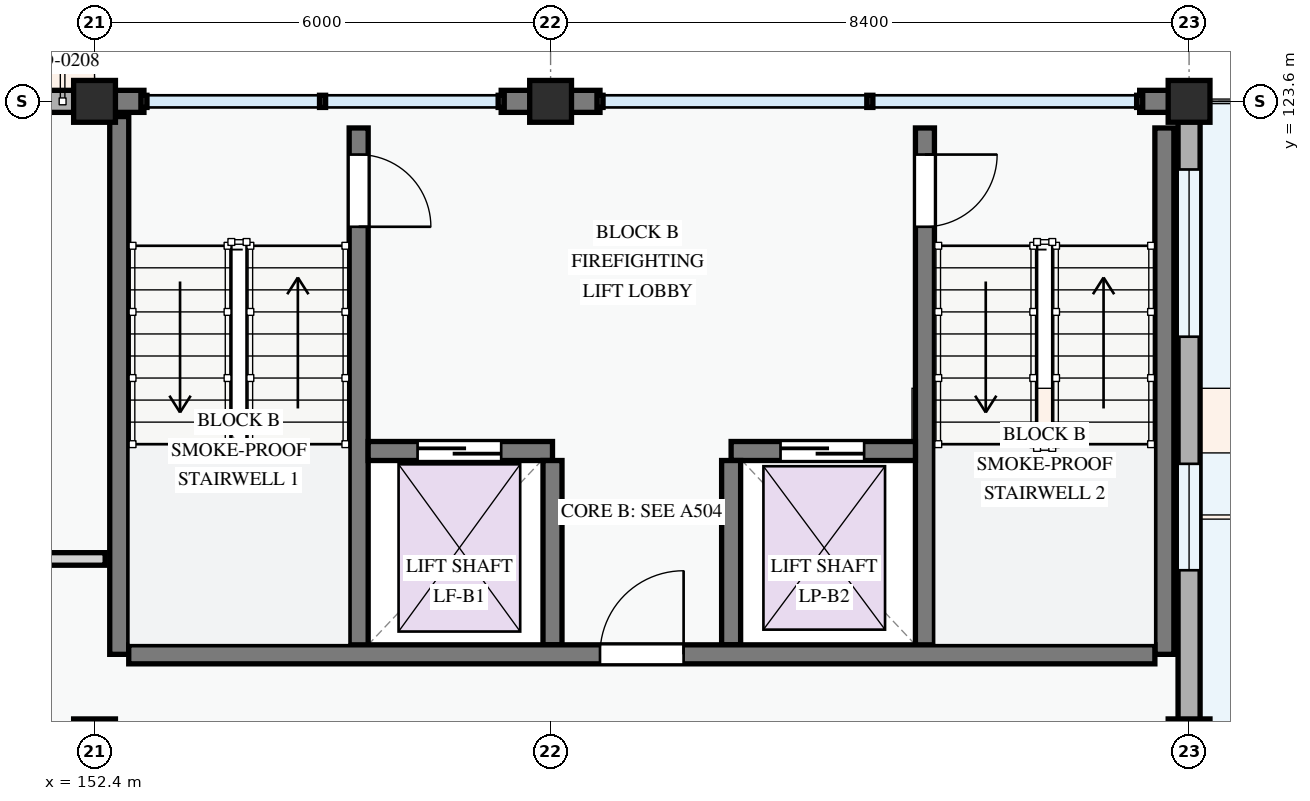
"""IFC4 building model, lengths in metres.
Left out: names, types, materials, properties, quantities, classifications, styles, units other than length and angle.
Written with IfcOpenShell. Run it as: python <this file> out.ifc"""

import sys

from ifc_helpers import new_model, si_unit, direction, frame, frame_2d, origin, origin_2d, place, context, subcontext, project, spatial, rectangle, extrude, element, fill, save


model = new_model("IFC4")
c1 = context("Model", 3, precision=1e-05, world=origin(), true_north=direction((0.0, 1.0)))
c2 = subcontext(c1, "Body", "Model", "MODEL_VIEW")
j1 = project(units=[si_unit("LENGTHUNIT", "METRE"), si_unit("PLANEANGLEUNIT", "RADIAN")], contexts=[c1])
p1 = place(None, origin())
s1 = spatial("IfcSite", under=j1, at=p1, CompositionType="ELEMENT")
p2 = place(p1, origin())
s2 = spatial("IfcBuilding", under=s1, at=p2, CompositionType="ELEMENT")
p3 = place(p2, frame((0.0, 0.0, 24.6)))
s3 = spatial("IfcBuildingStorey", under=s2, at=p3, CompositionType="ELEMENT", Elevation=24.6)
for number, where, z_axis, x_axis in (
    (1, (152.4, 115.2, 0.0), (0.0, 0.0, 1.0), (1.0, 0.0, 0.0)),
    (2, (152.4, 123.6, 0.0), (0.0, 0.0, 1.0), (1.0, 0.0, 0.0)),
    (3, (158.4, 123.6, 0.0), (0.0, 0.0, 1.0), (1.0, 0.0, 0.0)),
    (4, (166.8, 115.2, 0.0), (0.0, 0.0, 1.0), (1.0, 0.0, 0.0)),
    (5, (166.8, 123.6, 0.0), (0.0, 0.0, 1.0), (1.0, 0.0, 0.0)),
):
    element("IfcColumn", number, at=place(p3, frame(where, z_axis=z_axis, x_axis=x_axis)), inside=s3, PredefinedType="COLUMN", context=c2, shape_type="SweptSolid", body=[
        extrude(rectangle(XDim=0.55, YDim=0.55, at=origin_2d()), origin(), (0.0, 0.0, 1.0), 3.3),
    ])
p4 = place(p3, frame((166.8, 115.2, 0.0), z_axis=(0.0, 0.0, 1.0), x_axis=(0.0, 1.0, 0.0)))
e6 = element("IfcWall", 6, at=p4, inside=s3, PredefinedType="STANDARD", context=c2, shape_type="SweptSolid", body=[
    extrude(rectangle(XDim=8.4, YDim=0.29, at=frame_2d((4.2, 0.0))), origin(), (0.0, 0.0, 1.0), 2.425),
])
p5 = place(p4, frame((2.231, 0.0, 0.78)))
e7 = element("IfcOpeningElement", 7, at=p5, cuts=e6, PredefinedType="OPENING", context=c2, shape_type="SweptSolid", body=[
    extrude(rectangle(XDim=1.4, YDim=1.45, at=frame_2d((0.7, 0.725))), frame((0.0, 0.155, 0.0), z_axis=(0.0, -1.0, 0.0), x_axis=(1.0, 0.0, 0.0)), (0.0, 0.0, 1.0), 0.31),
])
p6 = place(p4, frame((5.304, 0.0, 0.78)))
e8 = element("IfcOpeningElement", 8, at=p6, cuts=e6, PredefinedType="OPENING", context=c2, shape_type="SweptSolid", body=[
    extrude(rectangle(XDim=2.2, YDim=1.5, at=frame_2d((1.1, 0.75))), frame((0.0, 0.155, 0.0), z_axis=(0.0, -1.0, 0.0), x_axis=(1.0, 0.0, 0.0)), (0.0, 0.0, 1.0), 0.31),
])
p7 = place(p3, frame((166.653, 123.6, 0.0), z_axis=(0.0, 0.0, 1.0), x_axis=(-1.0, 0.0, 0.0)))
e9 = element("IfcWall", 9, at=p7, inside=s3, PredefinedType="STANDARD", context=c2, shape_type="SweptSolid", body=[
    extrude(rectangle(XDim=0.503, YDim=0.29, at=frame_2d((0.251, 0.0))), origin(), (0.0, 0.0, 1.0), 3.04),
])
p8 = place(p3, frame((159.05, 123.6, 0.0), z_axis=(0.0, 0.0, 1.0), x_axis=(-1.0, 0.0, 0.0)))
e10 = element("IfcWall", 10, at=p8, inside=s3, PredefinedType="STANDARD", context=c2, shape_type="SweptSolid", body=[
    extrude(rectangle(XDim=0.65, YDim=0.29, at=frame_2d((0.325, 0.0))), origin(), (0.0, 0.0, 1.0), 3.04),
])
p9 = place(p3, frame((158.4, 123.6, 0.0), z_axis=(0.0, 0.0, 1.0), x_axis=(-1.0, 0.0, 0.0)))
e11 = element("IfcWall", 11, at=p9, inside=s3, PredefinedType="STANDARD", context=c2, shape_type="SweptSolid", body=[
    extrude(rectangle(XDim=0.65, YDim=0.29, at=frame_2d((0.325, 0.0))), origin(), (0.0, 0.0, 1.0), 3.04),
])
p10 = place(p3, frame((153.05, 123.6, 0.0), z_axis=(0.0, 0.0, 1.0), x_axis=(-1.0, 0.0, 0.0)))
e12 = element("IfcWall", 12, at=p10, inside=s3, PredefinedType="STANDARD", context=c2, shape_type="SweptSolid", body=[
    extrude(rectangle(XDim=0.65, YDim=0.29, at=frame_2d((0.325, 0.0))), origin(), (0.0, 0.0, 1.0), 3.04),
])
p11 = place(p3, frame((152.4, 123.6, 0.0), z_axis=(0.0, 0.0, 1.0), x_axis=(-1.0, 0.0, 0.0)))
e13 = element("IfcWall", 13, at=p11, inside=s3, PredefinedType="STANDARD", context=c2, shape_type="SweptSolid", body=[
    extrude(rectangle(XDim=8.4, YDim=0.29, at=frame_2d((4.2, 0.0))), origin(), (0.0, 0.0, 1.0), 2.375),
])
p12 = place(p11, frame((0.62, 0.0, 0.0)))
e14 = element("IfcOpeningElement", 14, at=p12, cuts=e13, PredefinedType="OPENING", context=c2, shape_type="SweptSolid", body=[
    extrude(rectangle(XDim=1.6, YDim=2.2, at=frame_2d((0.8, 1.1))), frame((0.0, 0.155, 0.0), z_axis=(0.0, -1.0, 0.0), x_axis=(1.0, 0.0, 0.0)), (0.0, 0.0, 1.0), 0.31),
])
p13 = place(p11, frame((3.315, 0.0, 0.78)))
e15 = element("IfcOpeningElement", 15, at=p13, cuts=e13, PredefinedType="OPENING", context=c2, shape_type="SweptSolid", body=[
    extrude(rectangle(XDim=0.95, YDim=1.15, at=frame_2d((0.475, 0.575))), frame((0.0, 0.155, 0.0), z_axis=(0.0, -1.0, 0.0), x_axis=(1.0, 0.0, 0.0)), (0.0, 0.0, 1.0), 0.31),
])
p14 = place(p11, frame((5.98, 0.0, 0.78)))
e16 = element("IfcOpeningElement", 16, at=p14, cuts=e13, PredefinedType="OPENING", context=c2, shape_type="SweptSolid", body=[
    extrude(rectangle(XDim=1.42, YDim=1.38, at=frame_2d((0.71, 0.69))), frame((0.0, 0.155, 0.0), z_axis=(0.0, -1.0, 0.0), x_axis=(1.0, 0.0, 0.0)), (0.0, 0.0, 1.0), 0.31),
])
p15 = place(p3, frame((155.875, 123.25, 0.0), z_axis=(0.0, 0.0, 1.0), x_axis=(0.0, -1.0, 0.0)))
e17 = element("IfcWall", 17, at=p15, inside=s3, PredefinedType="SHEAR", context=c2, shape_type="SweptSolid", body=[
    extrude(rectangle(XDim=6.925, YDim=0.25, at=frame_2d((3.462, 0.0))), origin(), (0.0, 0.0, 1.0), 3.0),
])
p16 = place(p15, frame((0.35, 0.0, 0.0)))
e18 = element("IfcOpeningElement", 18, at=p16, cuts=e17, PredefinedType="OPENING", context=c2, shape_type="SweptSolid", body=[
    extrude(rectangle(XDim=0.95, YDim=2.1, at=frame_2d((0.475, 1.05))), frame((0.0, 0.135, 0.0), z_axis=(0.0, -1.0, 0.0), x_axis=(1.0, 0.0, 0.0)), (0.0, 0.0, 1.0), 0.27),
])
p17 = place(p3, frame((152.725, 123.4, 0.0), z_axis=(0.0, 0.0, 1.0), x_axis=(0.0, -1.0, 0.0)))
e19 = element("IfcWall", 19, at=p17, inside=s3, PredefinedType="SHEAR", context=c2, shape_type="SweptSolid", body=[
    extrude(rectangle(XDim=7.075, YDim=0.25, at=frame_2d((3.538, 0.0))), origin(), (0.0, 0.0, 1.0), 3.0),
])
p18 = place(p3, frame((166.475, 123.25, 0.0), z_axis=(0.0, 0.0, 1.0), x_axis=(0.0, -1.0, 0.0)))
e20 = element("IfcWall", 20, at=p18, inside=s3, PredefinedType="SHEAR", context=c2, shape_type="SweptSolid", body=[
    extrude(rectangle(XDim=6.925, YDim=0.25, at=frame_2d((3.462, 0.0))), origin(), (0.0, 0.0, 1.0), 3.0),
])
p19 = place(p3, frame((163.325, 123.25, 0.0), z_axis=(0.0, 0.0, 1.0), x_axis=(0.0, -1.0, 0.0)))
e21 = element("IfcWall", 21, at=p19, inside=s3, PredefinedType="SHEAR", context=c2, shape_type="SweptSolid", body=[
    extrude(rectangle(XDim=6.925, YDim=0.25, at=frame_2d((3.462, 0.0))), origin(), (0.0, 0.0, 1.0), 3.0),
])
p20 = place(p19, frame((0.35, 0.0, 0.0)))
e22 = element("IfcOpeningElement", 22, at=p20, cuts=e21, PredefinedType="OPENING", context=c2, shape_type="SweptSolid", body=[
    extrude(rectangle(XDim=0.95, YDim=2.1, at=frame_2d((0.475, 1.05))), frame((0.0, 0.135, 0.0), z_axis=(0.0, -1.0, 0.0), x_axis=(1.0, 0.0, 0.0)), (0.0, 0.0, 1.0), 0.27),
])
p21 = place(p3, frame((156.0, 119.0, 0.0), z_axis=(0.0, 0.0, 1.0), x_axis=(1.0, 0.0, 0.0)))
e23 = element("IfcWall", 23, at=p21, inside=s3, PredefinedType="SHEAR", context=c2, shape_type="SweptSolid", body=[
    extrude(rectangle(XDim=2.425, YDim=0.25, at=frame_2d((1.212, 0.0))), origin(), (0.0, 0.0, 1.0), 3.0),
])
p22 = place(p21, frame((0.65, 0.0, 0.0)))
e24 = element("IfcOpeningElement", 24, at=p22, cuts=e23, PredefinedType="OPENING", context=c2, shape_type="SweptSolid", body=[
    extrude(rectangle(XDim=1.1, YDim=2.15, at=frame_2d((0.55, 1.075))), frame((0.0, 0.135, 0.0), z_axis=(0.0, -1.0, 0.0), x_axis=(1.0, 0.0, 0.0)), (0.0, 0.0, 1.0), 0.27),
])
p23 = place(p3, frame((160.775, 119.0, 0.0), z_axis=(0.0, 0.0, 1.0), x_axis=(1.0, 0.0, 0.0)))
e25 = element("IfcWall", 25, at=p23, inside=s3, PredefinedType="SHEAR", context=c2, shape_type="SweptSolid", body=[
    extrude(rectangle(XDim=2.425, YDim=0.25, at=frame_2d((1.212, 0.0))), origin(), (0.0, 0.0, 1.0), 3.0),
])
p24 = place(p23, frame((0.65, 0.0, 0.0)))
e26 = element("IfcOpeningElement", 26, at=p24, cuts=e25, PredefinedType="OPENING", context=c2, shape_type="SweptSolid", body=[
    extrude(rectangle(XDim=1.1, YDim=2.15, at=frame_2d((0.55, 1.075))), frame((0.0, 0.135, 0.0), z_axis=(0.0, -1.0, 0.0), x_axis=(1.0, 0.0, 0.0)), (0.0, 0.0, 1.0), 0.27),
])
for number, where, z_axis, x_axis in (
    (27, (158.425, 118.875, 0.0), (0.0, 0.0, 1.0), (0.0, -1.0, 0.0)),
    (28, (160.775, 118.875, 0.0), (0.0, 0.0, 1.0), (0.0, -1.0, 0.0)),
):
    element("IfcWall", number, at=place(p3, frame(where, z_axis=z_axis, x_axis=x_axis)), inside=s3, PredefinedType="SHEAR", context=c2, shape_type="SweptSolid", body=[
        extrude(rectangle(XDim=2.425, YDim=0.25, at=frame_2d((1.212, 0.0))), origin(), (0.0, 0.0, 1.0), 3.0),
    ])
p25 = place(p3, frame((152.85, 116.325, 0.0), z_axis=(0.0, 0.0, 1.0), x_axis=(1.0, 0.0, 0.0)))
e29 = element("IfcWall", 29, at=p25, inside=s3, PredefinedType="SHEAR", context=c2, shape_type="SweptSolid", body=[
    extrude(rectangle(XDim=13.5, YDim=0.25, at=frame_2d((6.75, 0.0))), origin(), (0.0, 0.0, 1.0), 3.0),
])
p26 = place(p25, frame((6.2, 0.0, 0.0)))
e30 = element("IfcOpeningElement", 30, at=p26, cuts=e29, PredefinedType="OPENING", context=c2, shape_type="SweptSolid", body=[
    extrude(rectangle(XDim=1.1, YDim=2.15, at=frame_2d((0.55, 1.075))), frame((0.0, 0.135, 0.0), z_axis=(0.0, -1.0, 0.0), x_axis=(1.0, 0.0, 0.0)), (0.0, 0.0, 1.0), 0.27),
])
p27 = place(p3, frame((80.547, 117.58, 0.0), z_axis=(0.0, 0.0, 1.0), x_axis=(1.0, 0.0, 0.0)))
e31 = element("IfcWall", 31, at=p27, inside=s3, PredefinedType="PARTITIONING", context=c2, shape_type="SweptSolid", body=[
    extrude(rectangle(XDim=71.993, YDim=0.165, at=frame_2d((35.997, 0.0))), origin(), (0.0, 0.0, 1.0), 3.0),
])
p28 = place(p27, frame((2.262, 0.0, 0.0)))
e32 = element("IfcOpeningElement", 32, at=p28, cuts=e31, PredefinedType="OPENING", context=c2, shape_type="SweptSolid", body=[
    extrude(rectangle(XDim=0.92, YDim=2.1, at=frame_2d((0.46, 1.05))), frame((0.0, 0.093, 0.0), z_axis=(0.0, -1.0, 0.0), x_axis=(1.0, 0.0, 0.0)), (0.0, 0.0, 1.0), 0.185),
])
p29 = place(p27, frame((23.945, 0.0, 0.0)))
e33 = element("IfcOpeningElement", 33, at=p29, cuts=e31, PredefinedType="OPENING", context=c2, shape_type="SweptSolid", body=[
    extrude(rectangle(XDim=0.92, YDim=2.1, at=frame_2d((0.46, 1.05))), frame((0.0, 0.093, 0.0), z_axis=(0.0, -1.0, 0.0), x_axis=(1.0, 0.0, 0.0)), (0.0, 0.0, 1.0), 0.185),
])
p30 = place(p27, frame((39.133, 0.0, 0.0)))
e34 = element("IfcOpeningElement", 34, at=p30, cuts=e31, PredefinedType="OPENING", context=c2, shape_type="SweptSolid", body=[
    extrude(rectangle(XDim=0.92, YDim=2.1, at=frame_2d((0.46, 1.05))), frame((0.0, 0.093, 0.0), z_axis=(0.0, -1.0, 0.0), x_axis=(1.0, 0.0, 0.0)), (0.0, 0.0, 1.0), 0.185),
])
p31 = place(p27, frame((59.929, 0.0, 0.0)))
e35 = element("IfcOpeningElement", 35, at=p31, cuts=e31, PredefinedType="OPENING", context=c2, shape_type="SweptSolid", body=[
    extrude(rectangle(XDim=0.92, YDim=2.1, at=frame_2d((0.46, 1.05))), frame((0.0, 0.093, 0.0), z_axis=(0.0, -1.0, 0.0), x_axis=(1.0, 0.0, 0.0)), (0.0, 0.0, 1.0), 0.185),
])
p32 = place(p5, origin())
e36 = element("IfcWindow", 36, at=p32, inside=s3, PartitioningType="SINGLE_PANEL", PredefinedType="WINDOW", context=c2, shape_type="SweptSolid", body=[
    extrude(rectangle(XDim=1.4, YDim=1.45, at=frame_2d((0.7, 0.725))), frame((0.0, 0.03, 0.0), z_axis=(0.0, -1.0, 0.0), x_axis=(1.0, 0.0, 0.0)), (0.0, 0.0, 1.0), 0.06),
])
fill(e7, e36)
p33 = place(p6, origin())
e37 = element("IfcWindow", 37, at=p33, inside=s3, PartitioningType="DOUBLE_PANEL_VERTICAL", PredefinedType="WINDOW", context=c2, shape_type="SweptSolid", body=[
    extrude(rectangle(XDim=2.2, YDim=1.5, at=frame_2d((1.1, 0.75))), frame((0.0, 0.03, 0.0), z_axis=(0.0, -1.0, 0.0), x_axis=(1.0, 0.0, 0.0)), (0.0, 0.0, 1.0), 0.06),
])
fill(e8, e37)
p34 = place(p16, origin())
e38 = element("IfcDoor", 38, at=p34, inside=s3, OperationType="SINGLE_SWING_RIGHT", PredefinedType="DOOR", context=c2, shape_type="SweptSolid", body=[
    extrude(rectangle(XDim=0.95, YDim=2.1, at=frame_2d((0.475, 1.05))), frame((0.0, 0.025, 0.0), z_axis=(0.0, -1.0, 0.0), x_axis=(1.0, 0.0, 0.0)), (0.0, 0.0, 1.0), 0.05),
])
fill(e18, e38)
p35 = place(p20, origin())
e39 = element("IfcDoor", 39, at=p35, inside=s3, OperationType="SINGLE_SWING_LEFT", PredefinedType="DOOR", context=c2, shape_type="SweptSolid", body=[
    extrude(rectangle(XDim=0.95, YDim=2.1, at=frame_2d((0.475, 1.05))), frame((0.0, 0.025, 0.0), z_axis=(0.0, -1.0, 0.0), x_axis=(1.0, 0.0, 0.0)), (0.0, 0.0, 1.0), 0.05),
])
fill(e22, e39)
p36 = place(p22, origin())
e40 = element("IfcDoor", 40, at=p36, inside=s3, OperationType="SLIDING_TO_LEFT", PredefinedType="DOOR", context=c2, shape_type="SweptSolid", body=[
    extrude(rectangle(XDim=1.1, YDim=2.15, at=frame_2d((0.55, 1.075))), frame((0.0, 0.025, 0.0), z_axis=(0.0, -1.0, 0.0), x_axis=(1.0, 0.0, 0.0)), (0.0, 0.0, 1.0), 0.05),
])
fill(e24, e40)
p37 = place(p24, origin())
e41 = element("IfcDoor", 41, at=p37, inside=s3, OperationType="SLIDING_TO_LEFT", PredefinedType="DOOR", context=c2, shape_type="SweptSolid", body=[
    extrude(rectangle(XDim=1.1, YDim=2.15, at=frame_2d((0.55, 1.075))), frame((0.0, 0.025, 0.0), z_axis=(0.0, -1.0, 0.0), x_axis=(1.0, 0.0, 0.0)), (0.0, 0.0, 1.0), 0.05),
])
fill(e26, e41)
p38 = place(p26, origin())
e42 = element("IfcDoor", 42, at=p38, inside=s3, OperationType="SINGLE_SWING_RIGHT", PredefinedType="DOOR", context=c2, shape_type="SweptSolid", body=[
    extrude(rectangle(XDim=1.1, YDim=2.15, at=frame_2d((0.55, 1.075))), frame((0.0, 0.025, 0.0), z_axis=(0.0, -1.0, 0.0), x_axis=(1.0, 0.0, 0.0)), (0.0, 0.0, 1.0), 0.05),
])
fill(e30, e42)
save(model, sys.argv[1])
